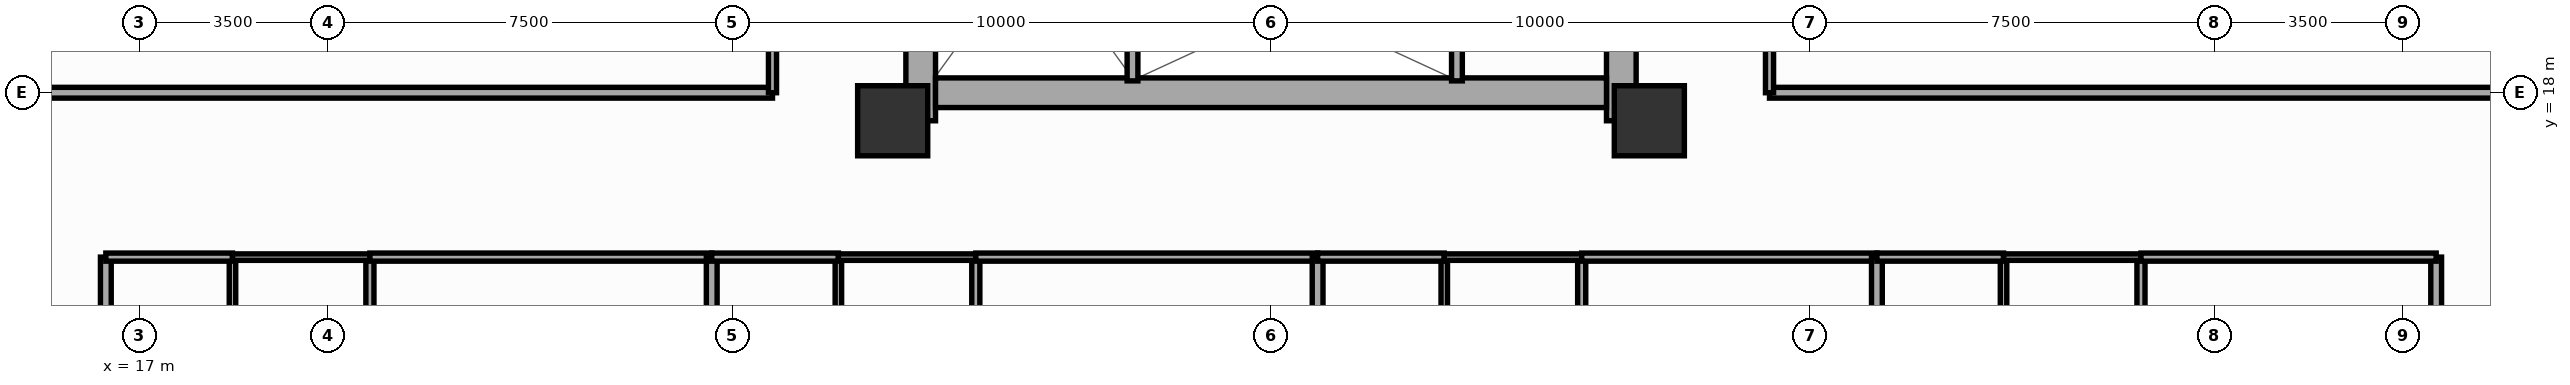
"""IFC4 building model, lengths in metres.
Left out: names, types, materials, properties, quantities, classifications, styles, units other than length and angle.
Written with IfcOpenShell. Run it as: python <this file> out.ifc"""

import sys

from ifc_helpers import new_model, si_unit, direction, frame, frame_2d, origin, origin_2d, place, context, subcontext, project, spatial, rectangle, extrude, source, transform, mapped, element, fill, save


model = new_model("IFC4")
c1 = context("Model", 3, precision=1e-05, world=origin(), true_north=direction((0.0, 1.0)))
c2 = subcontext(c1, "Body", "Model", "MODEL_VIEW")
j1 = project(units=[si_unit("LENGTHUNIT", "METRE"), si_unit("PLANEANGLEUNIT", "RADIAN")], contexts=[c1])
p1 = place(None, origin())
s1 = spatial("IfcSite", under=j1, at=p1, CompositionType="ELEMENT")
p2 = place(p1, origin())
s2 = spatial("IfcBuilding", under=s1, at=p2, CompositionType="ELEMENT")
p3 = place(p2, frame((0.0, 0.0, 74.35)))
s3 = spatial("IfcBuildingStorey", under=s2, at=p3, CompositionType="ELEMENT", Elevation=74.35)
p4 = place(p3, frame((31.5, 17.48, 0.0), z_axis=(0.0, 0.0, 1.0), x_axis=(0.0, 1.0, 0.0)))
e1 = element("IfcWall", 1, at=p4, inside=s3, PredefinedType="SHEAR", context=c2, shape_type="SweptSolid", body=[
    extrude(rectangle(XDim=19.04, YDim=0.55, at=frame_2d((9.52, 0.0))), origin(), (0.0, 0.0, 1.0), 3.5),
])
p5 = place(p4, frame((6.32, 0.0, 0.0)))
e2 = element("IfcOpeningElement", 2, at=p5, cuts=e1, PredefinedType="OPENING", context=c2, shape_type="SweptSolid", body=[
    extrude(rectangle(XDim=1.1, YDim=2.15, at=frame_2d((0.55, 1.075))), frame((0.0, 0.287, 0.0), z_axis=(0.0, -1.0, 0.0), x_axis=(1.0, 0.0, 0.0)), (0.0, 0.0, 1.0), 0.574),
])
p6 = place(p3, frame((44.5, 17.48, 0.0), z_axis=(0.0, 0.0, 1.0), x_axis=(0.0, 1.0, 0.0)))
e3 = element("IfcWall", 3, at=p6, inside=s3, PredefinedType="SHEAR", context=c2, shape_type="SweptSolid", body=[
    extrude(rectangle(XDim=19.04, YDim=0.55, at=frame_2d((9.52, 0.0))), origin(), (0.0, 0.0, 1.0), 3.5),
])
p7 = place(p6, frame((12.67, 0.0, 0.0), z_axis=(0.0, 0.0, 1.0), x_axis=(-1.0, 0.0, 0.0)))
e4 = element("IfcOpeningElement", 4, at=p7, cuts=e3, PredefinedType="OPENING", context=c2, shape_type="SweptSolid", body=[
    extrude(rectangle(XDim=1.1, YDim=2.15, at=frame_2d((0.55, 1.075))), frame((0.0, 0.287, 0.0), z_axis=(0.0, -1.0, 0.0), x_axis=(1.0, 0.0, 0.0)), (0.0, 0.0, 1.0), 0.574),
])
p8 = place(p3, frame((31.775, 18.0, 0.0), z_axis=(0.0, 0.0, 1.0), x_axis=(1.0, 0.0, 0.0)))
e5 = element("IfcWall", 5, at=p8, inside=s3, PredefinedType="SHEAR", context=c2, shape_type="SweptSolid", body=[
    extrude(rectangle(XDim=12.45, YDim=0.55, at=frame_2d((6.225, 0.0))), origin(), (0.0, 0.0, 1.0), 3.5),
])
m1 = source(origin(), c2, "Body", "SweptSolid", [
    extrude(rectangle(XDim=1.3, YDim=1.3, at=origin_2d()), origin(), (0.0, 0.0, 1.0), 3.5),
])
for number, where, z_axis, x_axis in (
    (6, (30.98, 17.48, 0.0), (0.0, 0.0, 1.0), (1.0, 0.0, 0.0)),
    (7, (45.02, 17.48, 0.0), (0.0, 0.0, 1.0), (1.0, 0.0, 0.0)),
):
    element("IfcColumn", number, at=place(p3, frame(where, z_axis=z_axis, x_axis=x_axis)), inside=s3, PredefinedType="COLUMN", context=c2, shape_type="MappedRepresentation", body=[
        mapped(m1, transform((0.0, 0.0, 0.0), scale=1.0)),
    ])
p9 = place(p3, frame((41.45, 18.22, 0.0), z_axis=(0.0, 0.0, 1.0), x_axis=(0.0, 1.0, 0.0)))
e8 = element("IfcWall", 8, at=p9, inside=s3, PredefinedType="PARTITIONING", context=c2, shape_type="SweptSolid", body=[
    extrude(rectangle(XDim=2.96, YDim=0.2, at=frame_2d((1.48, 0.0))), origin(), (0.0, 0.0, 1.0), 3.29),
])
p10 = place(p3, frame((35.43, 18.22, 0.0), z_axis=(0.0, 0.0, 1.0), x_axis=(0.0, 1.0, 0.0)))
e9 = element("IfcWall", 9, at=p10, inside=s3, PredefinedType="SOLIDWALL", context=c2, shape_type="SweptSolid", body=[
    extrude(rectangle(XDim=7.22, YDim=0.2, at=frame_2d((3.61, 0.0))), origin(), (0.0, 0.0, 1.0), 3.29),
])
p11 = place(p10, frame((6.68, 0.0, 0.0), z_axis=(0.0, 0.0, 1.0), x_axis=(-1.0, 0.0, 0.0)))
e10 = element("IfcOpeningElement", 10, at=p11, cuts=e9, PredefinedType="OPENING", context=c2, shape_type="SweptSolid", body=[
    extrude(rectangle(XDim=1.1, YDim=2.15, at=frame_2d((0.55, 1.075))), frame((0.0, 0.112, 0.0), z_axis=(0.0, -1.0, 0.0), x_axis=(1.0, 0.0, 0.0)), (0.0, 0.0, 1.0), 0.224),
])
for number, where, z_axis, x_axis in (
    (11, (16.38, 14.95, 0.0), (0.0, 0.0, 1.0), (0.0, -1.0, 0.0)),
    (12, (59.62, 14.95, 0.0), (0.0, 0.0, 1.0), (0.0, -1.0, 0.0)),
):
    element("IfcWall", number, at=place(p3, frame(where, z_axis=z_axis, x_axis=x_axis)), inside=s3, PredefinedType="PARTITIONING", context=c2, shape_type="SweptSolid", body=[
        extrude(rectangle(XDim=11.8, YDim=0.2, at=frame_2d((5.9, 0.0))), origin(), (0.0, 0.0, 1.0), 3.29),
    ])
p12 = place(p3, frame((18.73, 14.95, 0.0), z_axis=(0.0, 0.0, 1.0), x_axis=(0.0, -1.0, 0.0)))
e13 = element("IfcWall", 13, at=p12, inside=s3, PredefinedType="PARTITIONING", context=c2, shape_type="SweptSolid", body=[
    extrude(rectangle(XDim=3.6, YDim=0.12, at=frame_2d((1.8, 0.0))), origin(), (0.0, 0.0, 1.0), 3.29),
])
p13 = place(p3, frame((21.28, 14.95, 0.0), z_axis=(0.0, 0.0, 1.0), x_axis=(0.0, -1.0, 0.0)))
e14 = element("IfcWall", 14, at=p13, inside=s3, PredefinedType="PARTITIONING", context=c2, shape_type="SweptSolid", body=[
    extrude(rectangle(XDim=3.6, YDim=0.15, at=frame_2d((1.8, 0.0))), origin(), (0.0, 0.0, 1.0), 3.29),
])
p14 = place(p3, frame((16.38, 14.95, 0.0), z_axis=(0.0, 0.0, 1.0), x_axis=(1.0, 0.0, 0.0)))
e15 = element("IfcWall", 15, at=p14, inside=s3, PredefinedType="PARTITIONING", context=c2, shape_type="SweptSolid", body=[
    extrude(rectangle(XDim=2.35, YDim=0.15, at=frame_2d((1.175, 0.0))), origin(), (0.0, 0.0, 1.0), 3.29),
])
p15 = place(p14, frame((0.725, 0.0, 0.0)))
e16 = element("IfcOpeningElement", 16, at=p15, cuts=e15, PredefinedType="OPENING", context=c2, shape_type="SweptSolid", body=[
    extrude(rectangle(XDim=0.9, YDim=2.1, at=frame_2d((0.45, 1.05))), frame((0.0, 0.087, 0.0), z_axis=(0.0, -1.0, 0.0), x_axis=(1.0, 0.0, 0.0)), (0.0, 0.0, 1.0), 0.174),
])
p16 = place(p3, frame((18.73, 14.95, 0.0), z_axis=(0.0, 0.0, 1.0), x_axis=(1.0, 0.0, 0.0)))
e17 = element("IfcWall", 17, at=p16, inside=s3, PredefinedType="PARTITIONING", context=c2, shape_type="SweptSolid", body=[
    extrude(rectangle(XDim=2.55, YDim=0.12, at=frame_2d((1.275, 0.0))), origin(), (0.0, 0.0, 1.0), 3.29),
])
p17 = place(p16, frame((0.775, 0.0, 0.0)))
e18 = element("IfcOpeningElement", 18, at=p17, cuts=e17, PredefinedType="OPENING", context=c2, shape_type="SweptSolid", body=[
    extrude(rectangle(XDim=1.0, YDim=2.1, at=frame_2d((0.5, 1.05))), frame((0.0, 0.072, 0.0), z_axis=(0.0, -1.0, 0.0), x_axis=(1.0, 0.0, 0.0)), (0.0, 0.0, 1.0), 0.144),
])
p18 = place(p3, frame((21.28, 14.95, 0.0), z_axis=(0.0, 0.0, 1.0), x_axis=(1.0, 0.0, 0.0)))
e19 = element("IfcWall", 19, at=p18, inside=s3, PredefinedType="PARTITIONING", context=c2, shape_type="SweptSolid", body=[
    extrude(rectangle(XDim=6.342, YDim=0.15, at=frame_2d((3.171, 0.0))), origin(), (0.0, 0.0, 1.0), 3.29),
])
p19 = place(p18, frame((2.424, 0.0, 0.0)))
e20 = element("IfcOpeningElement", 20, at=p19, cuts=e19, PredefinedType="OPENING", context=c2, shape_type="SweptSolid", body=[
    extrude(rectangle(XDim=1.1, YDim=2.15, at=frame_2d((0.55, 1.075))), frame((0.0, 0.087, 0.0), z_axis=(0.0, -1.0, 0.0), x_axis=(1.0, 0.0, 0.0)), (0.0, 0.0, 1.0), 0.174),
])
p20 = place(p3, frame((27.622, 14.95, 0.0), z_axis=(0.0, 0.0, 1.0), x_axis=(0.0, -1.0, 0.0)))
e21 = element("IfcWall", 21, at=p20, inside=s3, PredefinedType="PARTITIONING", context=c2, shape_type="SweptSolid", body=[
    extrude(rectangle(XDim=11.8, YDim=0.2, at=frame_2d((5.9, 0.0))), origin(), (0.0, 0.0, 1.0), 3.29),
])
p21 = place(p3, frame((29.972, 14.95, 0.0), z_axis=(0.0, 0.0, 1.0), x_axis=(0.0, -1.0, 0.0)))
e22 = element("IfcWall", 22, at=p21, inside=s3, PredefinedType="PARTITIONING", context=c2, shape_type="SweptSolid", body=[
    extrude(rectangle(XDim=3.6, YDim=0.12, at=frame_2d((1.8, 0.0))), origin(), (0.0, 0.0, 1.0), 3.29),
])
p22 = place(p3, frame((32.522, 14.95, 0.0), z_axis=(0.0, 0.0, 1.0), x_axis=(0.0, -1.0, 0.0)))
e23 = element("IfcWall", 23, at=p22, inside=s3, PredefinedType="PARTITIONING", context=c2, shape_type="SweptSolid", body=[
    extrude(rectangle(XDim=3.6, YDim=0.15, at=frame_2d((1.8, 0.0))), origin(), (0.0, 0.0, 1.0), 3.29),
])
p23 = place(p3, frame((27.622, 14.95, 0.0), z_axis=(0.0, 0.0, 1.0), x_axis=(1.0, 0.0, 0.0)))
e24 = element("IfcWall", 24, at=p23, inside=s3, PredefinedType="PARTITIONING", context=c2, shape_type="SweptSolid", body=[
    extrude(rectangle(XDim=2.35, YDim=0.15, at=frame_2d((1.175, 0.0))), origin(), (0.0, 0.0, 1.0), 3.29),
])
p24 = place(p23, frame((0.725, 0.0, 0.0)))
e25 = element("IfcOpeningElement", 25, at=p24, cuts=e24, PredefinedType="OPENING", context=c2, shape_type="SweptSolid", body=[
    extrude(rectangle(XDim=0.9, YDim=2.1, at=frame_2d((0.45, 1.05))), frame((0.0, 0.087, 0.0), z_axis=(0.0, -1.0, 0.0), x_axis=(1.0, 0.0, 0.0)), (0.0, 0.0, 1.0), 0.174),
])
p25 = place(p3, frame((29.972, 14.95, 0.0), z_axis=(0.0, 0.0, 1.0), x_axis=(1.0, 0.0, 0.0)))
e26 = element("IfcWall", 26, at=p25, inside=s3, PredefinedType="PARTITIONING", context=c2, shape_type="SweptSolid", body=[
    extrude(rectangle(XDim=2.55, YDim=0.12, at=frame_2d((1.275, 0.0))), origin(), (0.0, 0.0, 1.0), 3.29),
])
p26 = place(p25, frame((1.29, 0.0, 0.0)))
e27 = element("IfcOpeningElement", 27, at=p26, cuts=e26, PredefinedType="OPENING", context=c2, shape_type="SweptSolid", body=[
    extrude(rectangle(XDim=1.0, YDim=2.1, at=frame_2d((0.5, 1.05))), frame((0.0, 0.072, 0.0), z_axis=(0.0, -1.0, 0.0), x_axis=(1.0, 0.0, 0.0)), (0.0, 0.0, 1.0), 0.144),
])
p27 = place(p3, frame((32.522, 14.95, 0.0), z_axis=(0.0, 0.0, 1.0), x_axis=(1.0, 0.0, 0.0)))
e28 = element("IfcWall", 28, at=p27, inside=s3, PredefinedType="PARTITIONING", context=c2, shape_type="SweptSolid", body=[
    extrude(rectangle(XDim=6.342, YDim=0.15, at=frame_2d((3.171, 0.0))), origin(), (0.0, 0.0, 1.0), 3.29),
])
p28 = place(p27, frame((2.424, 0.0, 0.0)))
e29 = element("IfcOpeningElement", 29, at=p28, cuts=e28, PredefinedType="OPENING", context=c2, shape_type="SweptSolid", body=[
    extrude(rectangle(XDim=1.1, YDim=2.15, at=frame_2d((0.55, 1.075))), frame((0.0, 0.087, 0.0), z_axis=(0.0, -1.0, 0.0), x_axis=(1.0, 0.0, 0.0)), (0.0, 0.0, 1.0), 0.174),
])
p29 = place(p3, frame((38.865, 14.95, 0.0), z_axis=(0.0, 0.0, 1.0), x_axis=(0.0, -1.0, 0.0)))
e30 = element("IfcWall", 30, at=p29, inside=s3, PredefinedType="PARTITIONING", context=c2, shape_type="SweptSolid", body=[
    extrude(rectangle(XDim=11.8, YDim=0.2, at=frame_2d((5.9, 0.0))), origin(), (0.0, 0.0, 1.0), 3.29),
])
p30 = place(p3, frame((41.215, 14.95, 0.0), z_axis=(0.0, 0.0, 1.0), x_axis=(0.0, -1.0, 0.0)))
e31 = element("IfcWall", 31, at=p30, inside=s3, PredefinedType="PARTITIONING", context=c2, shape_type="SweptSolid", body=[
    extrude(rectangle(XDim=3.6, YDim=0.12, at=frame_2d((1.8, 0.0))), origin(), (0.0, 0.0, 1.0), 3.29),
])
p31 = place(p3, frame((43.765, 14.95, 0.0), z_axis=(0.0, 0.0, 1.0), x_axis=(0.0, -1.0, 0.0)))
e32 = element("IfcWall", 32, at=p31, inside=s3, PredefinedType="PARTITIONING", context=c2, shape_type="SweptSolid", body=[
    extrude(rectangle(XDim=3.6, YDim=0.15, at=frame_2d((1.8, 0.0))), origin(), (0.0, 0.0, 1.0), 3.29),
])
p32 = place(p3, frame((38.865, 14.95, 0.0), z_axis=(0.0, 0.0, 1.0), x_axis=(1.0, 0.0, 0.0)))
e33 = element("IfcWall", 33, at=p32, inside=s3, PredefinedType="PARTITIONING", context=c2, shape_type="SweptSolid", body=[
    extrude(rectangle(XDim=2.35, YDim=0.15, at=frame_2d((1.175, 0.0))), origin(), (0.0, 0.0, 1.0), 3.29),
])
p33 = place(p32, frame((0.725, 0.0, 0.0)))
e34 = element("IfcOpeningElement", 34, at=p33, cuts=e33, PredefinedType="OPENING", context=c2, shape_type="SweptSolid", body=[
    extrude(rectangle(XDim=0.9, YDim=2.1, at=frame_2d((0.45, 1.05))), frame((0.0, 0.087, 0.0), z_axis=(0.0, -1.0, 0.0), x_axis=(1.0, 0.0, 0.0)), (0.0, 0.0, 1.0), 0.174),
])
p34 = place(p3, frame((41.215, 14.95, 0.0), z_axis=(0.0, 0.0, 1.0), x_axis=(1.0, 0.0, 0.0)))
e35 = element("IfcWall", 35, at=p34, inside=s3, PredefinedType="PARTITIONING", context=c2, shape_type="SweptSolid", body=[
    extrude(rectangle(XDim=2.55, YDim=0.12, at=frame_2d((1.275, 0.0))), origin(), (0.0, 0.0, 1.0), 3.29),
])
p35 = place(p34, frame((0.775, 0.0, 0.0)))
e36 = element("IfcOpeningElement", 36, at=p35, cuts=e35, PredefinedType="OPENING", context=c2, shape_type="SweptSolid", body=[
    extrude(rectangle(XDim=1.0, YDim=2.1, at=frame_2d((0.5, 1.05))), frame((0.0, 0.072, 0.0), z_axis=(0.0, -1.0, 0.0), x_axis=(1.0, 0.0, 0.0)), (0.0, 0.0, 1.0), 0.144),
])
p36 = place(p3, frame((43.765, 14.95, 0.0), z_axis=(0.0, 0.0, 1.0), x_axis=(1.0, 0.0, 0.0)))
e37 = element("IfcWall", 37, at=p36, inside=s3, PredefinedType="PARTITIONING", context=c2, shape_type="SweptSolid", body=[
    extrude(rectangle(XDim=5.478, YDim=0.15, at=frame_2d((2.739, 0.0))), origin(), (0.0, 0.0, 1.0), 3.29),
])
p37 = place(p36, frame((2.028, 0.0, 0.0)))
e38 = element("IfcOpeningElement", 38, at=p37, cuts=e37, PredefinedType="OPENING", context=c2, shape_type="SweptSolid", body=[
    extrude(rectangle(XDim=1.1, YDim=2.15, at=frame_2d((0.55, 1.075))), frame((0.0, 0.087, 0.0), z_axis=(0.0, -1.0, 0.0), x_axis=(1.0, 0.0, 0.0)), (0.0, 0.0, 1.0), 0.174),
])
p38 = place(p3, frame((49.242, 14.95, 0.0), z_axis=(0.0, 0.0, 1.0), x_axis=(0.0, -1.0, 0.0)))
e39 = element("IfcWall", 39, at=p38, inside=s3, PredefinedType="PARTITIONING", context=c2, shape_type="SweptSolid", body=[
    extrude(rectangle(XDim=11.8, YDim=0.2, at=frame_2d((5.9, 0.0))), origin(), (0.0, 0.0, 1.0), 3.29),
])
p39 = place(p3, frame((51.592, 14.95, 0.0), z_axis=(0.0, 0.0, 1.0), x_axis=(0.0, -1.0, 0.0)))
e40 = element("IfcWall", 40, at=p39, inside=s3, PredefinedType="PARTITIONING", context=c2, shape_type="SweptSolid", body=[
    extrude(rectangle(XDim=3.6, YDim=0.12, at=frame_2d((1.8, 0.0))), origin(), (0.0, 0.0, 1.0), 3.29),
])
p40 = place(p3, frame((54.142, 14.95, 0.0), z_axis=(0.0, 0.0, 1.0), x_axis=(0.0, -1.0, 0.0)))
e41 = element("IfcWall", 41, at=p40, inside=s3, PredefinedType="PARTITIONING", context=c2, shape_type="SweptSolid", body=[
    extrude(rectangle(XDim=3.6, YDim=0.15, at=frame_2d((1.8, 0.0))), origin(), (0.0, 0.0, 1.0), 3.29),
])
p41 = place(p3, frame((49.242, 14.95, 0.0), z_axis=(0.0, 0.0, 1.0), x_axis=(1.0, 0.0, 0.0)))
e42 = element("IfcWall", 42, at=p41, inside=s3, PredefinedType="PARTITIONING", context=c2, shape_type="SweptSolid", body=[
    extrude(rectangle(XDim=2.35, YDim=0.15, at=frame_2d((1.175, 0.0))), origin(), (0.0, 0.0, 1.0), 3.29),
])
p42 = place(p41, frame((0.725, 0.0, 0.0)))
e43 = element("IfcOpeningElement", 43, at=p42, cuts=e42, PredefinedType="OPENING", context=c2, shape_type="SweptSolid", body=[
    extrude(rectangle(XDim=0.9, YDim=2.1, at=frame_2d((0.45, 1.05))), frame((0.0, 0.087, 0.0), z_axis=(0.0, -1.0, 0.0), x_axis=(1.0, 0.0, 0.0)), (0.0, 0.0, 1.0), 0.174),
])
p43 = place(p3, frame((51.592, 14.95, 0.0), z_axis=(0.0, 0.0, 1.0), x_axis=(1.0, 0.0, 0.0)))
e44 = element("IfcWall", 44, at=p43, inside=s3, PredefinedType="PARTITIONING", context=c2, shape_type="SweptSolid", body=[
    extrude(rectangle(XDim=2.55, YDim=0.12, at=frame_2d((1.275, 0.0))), origin(), (0.0, 0.0, 1.0), 3.29),
])
p44 = place(p43, frame((0.775, 0.0, 0.0)))
e45 = element("IfcOpeningElement", 45, at=p44, cuts=e44, PredefinedType="OPENING", context=c2, shape_type="SweptSolid", body=[
    extrude(rectangle(XDim=1.0, YDim=2.1, at=frame_2d((0.5, 1.05))), frame((0.0, 0.072, 0.0), z_axis=(0.0, -1.0, 0.0), x_axis=(1.0, 0.0, 0.0)), (0.0, 0.0, 1.0), 0.144),
])
p45 = place(p3, frame((54.142, 14.95, 0.0), z_axis=(0.0, 0.0, 1.0), x_axis=(1.0, 0.0, 0.0)))
e46 = element("IfcWall", 46, at=p45, inside=s3, PredefinedType="PARTITIONING", context=c2, shape_type="SweptSolid", body=[
    extrude(rectangle(XDim=5.478, YDim=0.15, at=frame_2d((2.739, 0.0))), origin(), (0.0, 0.0, 1.0), 3.29),
])
p46 = place(p45, frame((2.028, 0.0, 0.0)))
e47 = element("IfcOpeningElement", 47, at=p46, cuts=e46, PredefinedType="OPENING", context=c2, shape_type="SweptSolid", body=[
    extrude(rectangle(XDim=1.1, YDim=2.15, at=frame_2d((0.55, 1.075))), frame((0.0, 0.087, 0.0), z_axis=(0.0, -1.0, 0.0), x_axis=(1.0, 0.0, 0.0)), (0.0, 0.0, 1.0), 0.174),
])
p47 = place(p3, frame((28.75, 18.0, 0.0), z_axis=(0.0, 0.0, 1.0), x_axis=(-1.0, 0.0, 0.0)))
e48 = element("IfcWall", 48, at=p47, inside=s3, PredefinedType="PARTITIONING", context=c2, shape_type="SweptSolid", body=[
    extrude(rectangle(XDim=16.6, YDim=0.2, at=frame_2d((8.3, 0.0))), origin(), (0.0, 0.0, 1.0), 2.84),
])
p48 = place(p3, frame((28.75, 18.0, 0.0), z_axis=(0.0, 0.0, 1.0), x_axis=(0.0, 1.0, 0.0)))
e49 = element("IfcWall", 49, at=p48, inside=s3, PredefinedType="PARTITIONING", context=c2, shape_type="SweptSolid", body=[
    extrude(rectangle(XDim=8.975, YDim=0.15, at=frame_2d((4.488, 0.0))), origin(), (0.0, 0.0, 1.0), 3.29),
])
p49 = place(p48, frame((3.938, 0.0, 0.0)))
e50 = element("IfcOpeningElement", 50, at=p49, cuts=e49, PredefinedType="OPENING", context=c2, shape_type="SweptSolid", body=[
    extrude(rectangle(XDim=1.1, YDim=2.15, at=frame_2d((0.55, 1.075))), frame((0.0, 0.087, 0.0), z_axis=(0.0, -1.0, 0.0), x_axis=(1.0, 0.0, 0.0)), (0.0, 0.0, 1.0), 0.174),
])
p50 = place(p3, frame((47.25, 18.0, 0.0), z_axis=(0.0, 0.0, 1.0), x_axis=(1.0, 0.0, 0.0)))
e51 = element("IfcWall", 51, at=p50, inside=s3, PredefinedType="PARTITIONING", context=c2, shape_type="SweptSolid", body=[
    extrude(rectangle(XDim=16.6, YDim=0.2, at=frame_2d((8.3, 0.0))), origin(), (0.0, 0.0, 1.0), 2.84),
])
p51 = place(p3, frame((47.25, 18.0, 0.0), z_axis=(0.0, 0.0, 1.0), x_axis=(0.0, 1.0, 0.0)))
e52 = element("IfcWall", 52, at=p51, inside=s3, PredefinedType="PARTITIONING", context=c2, shape_type="SweptSolid", body=[
    extrude(rectangle(XDim=8.975, YDim=0.15, at=frame_2d((4.488, 0.0))), origin(), (0.0, 0.0, 1.0), 3.29),
])
p52 = place(p51, frame((3.938, 0.0, 0.0)))
e53 = element("IfcOpeningElement", 53, at=p52, cuts=e52, PredefinedType="OPENING", context=c2, shape_type="SweptSolid", body=[
    extrude(rectangle(XDim=1.1, YDim=2.15, at=frame_2d((0.55, 1.075))), frame((0.0, 0.087, 0.0), z_axis=(0.0, -1.0, 0.0), x_axis=(1.0, 0.0, 0.0)), (0.0, 0.0, 1.0), 0.174),
])
m2 = source(origin(), c2, "Body", "SweptSolid", [
    extrude(rectangle(XDim=0.9, YDim=2.1, at=frame_2d((0.45, 1.05))), frame((0.0, 0.025, 0.0), z_axis=(0.0, -1.0, 0.0), x_axis=(1.0, 0.0, 0.0)), (0.0, 0.0, 1.0), 0.05),
])
p53 = place(p15, origin())
e54 = element("IfcDoor", 54, at=p53, inside=s3, OperationType="SINGLE_SWING_LEFT", PredefinedType="DOOR", context=c2, shape_type="MappedRepresentation", body=[
    mapped(m2, transform((0.0, 0.0, 0.0), scale=1.0)),
])
fill(e16, e54)
m3 = source(origin(), c2, "Body", "SweptSolid", [
    extrude(rectangle(XDim=1.0, YDim=2.1, at=frame_2d((0.5, 1.05))), frame((0.0, 0.025, 0.0), z_axis=(0.0, -1.0, 0.0), x_axis=(1.0, 0.0, 0.0)), (0.0, 0.0, 1.0), 0.05),
])
p54 = place(p17, origin())
e55 = element("IfcDoor", 55, at=p54, inside=s3, OperationType="SINGLE_SWING_RIGHT", PredefinedType="DOOR", context=c2, shape_type="MappedRepresentation", body=[
    mapped(m3, transform((0.0, 0.0, 0.0), scale=1.0)),
])
fill(e18, e55)
m4 = source(origin(), c2, "Body", "SweptSolid", [
    extrude(rectangle(XDim=1.1, YDim=2.15, at=frame_2d((0.55, 1.075))), frame((0.0, 0.025, 0.0), z_axis=(0.0, -1.0, 0.0), x_axis=(1.0, 0.0, 0.0)), (0.0, 0.0, 1.0), 0.05),
])
p55 = place(p19, origin())
e56 = element("IfcDoor", 56, at=p55, inside=s3, OperationType="SINGLE_SWING_LEFT", PredefinedType="DOOR", context=c2, shape_type="MappedRepresentation", body=[
    mapped(m4, transform((0.0, 0.0, 0.0), scale=1.0)),
])
fill(e20, e56)
p56 = place(p24, origin())
e57 = element("IfcDoor", 57, at=p56, inside=s3, OperationType="SINGLE_SWING_LEFT", PredefinedType="DOOR", context=c2, shape_type="MappedRepresentation", body=[
    mapped(m2, transform((0.0, 0.0, 0.0), scale=1.0)),
])
fill(e25, e57)
p57 = place(p26, origin())
e58 = element("IfcDoor", 58, at=p57, inside=s3, OperationType="SINGLE_SWING_RIGHT", PredefinedType="DOOR", context=c2, shape_type="MappedRepresentation", body=[
    mapped(m3, transform((0.0, 0.0, 0.0), scale=1.0)),
])
fill(e27, e58)
p58 = place(p28, origin())
e59 = element("IfcDoor", 59, at=p58, inside=s3, OperationType="SINGLE_SWING_LEFT", PredefinedType="DOOR", context=c2, shape_type="MappedRepresentation", body=[
    mapped(m4, transform((0.0, 0.0, 0.0), scale=1.0)),
])
fill(e29, e59)
p59 = place(p33, origin())
e60 = element("IfcDoor", 60, at=p59, inside=s3, OperationType="SINGLE_SWING_LEFT", PredefinedType="DOOR", context=c2, shape_type="MappedRepresentation", body=[
    mapped(m2, transform((0.0, 0.0, 0.0), scale=1.0)),
])
fill(e34, e60)
p60 = place(p35, origin())
e61 = element("IfcDoor", 61, at=p60, inside=s3, OperationType="SINGLE_SWING_RIGHT", PredefinedType="DOOR", context=c2, shape_type="MappedRepresentation", body=[
    mapped(m3, transform((0.0, 0.0, 0.0), scale=1.0)),
])
fill(e36, e61)
p61 = place(p37, origin())
e62 = element("IfcDoor", 62, at=p61, inside=s3, OperationType="SINGLE_SWING_LEFT", PredefinedType="DOOR", context=c2, shape_type="MappedRepresentation", body=[
    mapped(m4, transform((0.0, 0.0, 0.0), scale=1.0)),
])
fill(e38, e62)
p62 = place(p42, origin())
e63 = element("IfcDoor", 63, at=p62, inside=s3, OperationType="SINGLE_SWING_LEFT", PredefinedType="DOOR", context=c2, shape_type="MappedRepresentation", body=[
    mapped(m2, transform((0.0, 0.0, 0.0), scale=1.0)),
])
fill(e43, e63)
p63 = place(p44, origin())
e64 = element("IfcDoor", 64, at=p63, inside=s3, OperationType="SINGLE_SWING_RIGHT", PredefinedType="DOOR", context=c2, shape_type="MappedRepresentation", body=[
    mapped(m3, transform((0.0, 0.0, 0.0), scale=1.0)),
])
fill(e45, e64)
p64 = place(p46, origin())
e65 = element("IfcDoor", 65, at=p64, inside=s3, OperationType="SINGLE_SWING_LEFT", PredefinedType="DOOR", context=c2, shape_type="MappedRepresentation", body=[
    mapped(m4, transform((0.0, 0.0, 0.0), scale=1.0)),
])
fill(e47, e65)
save(model, sys.argv[1])
